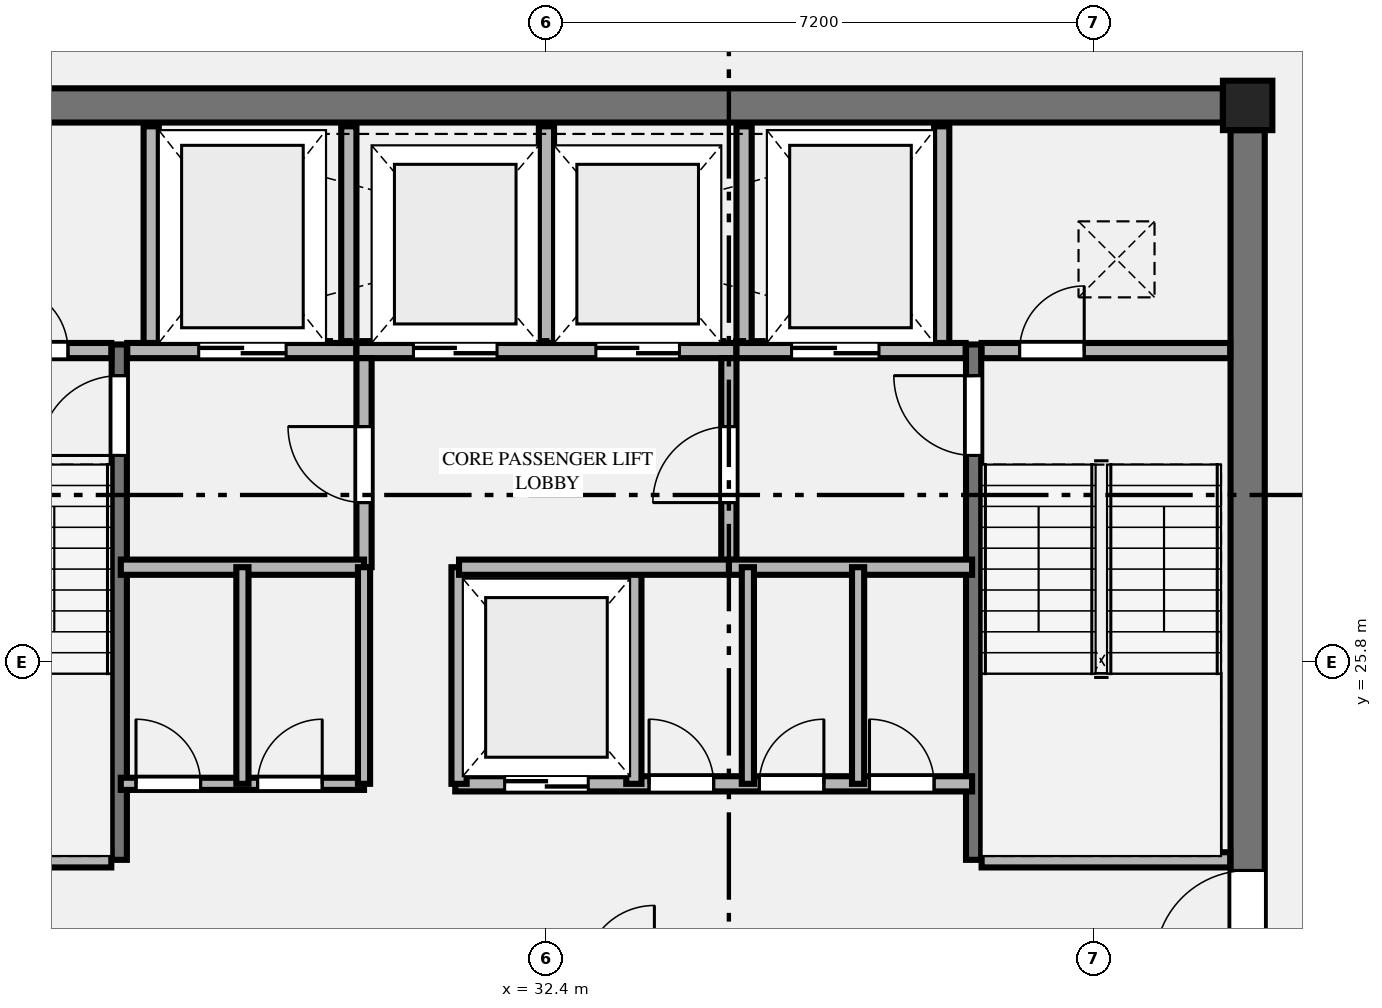
"""IFC4 building model, lengths in metres.
Left out: names, types, materials, properties, quantities, classifications, styles, units other than length and angle.
Written with IfcOpenShell. Run it as: python <this file> out.ifc"""

import sys

from ifc_helpers import new_model, si_unit, direction, frame, frame_2d, origin, origin_2d, place, context, subcontext, project, spatial, rectangle, extrude, element, fill, save


model = new_model("IFC4")
c1 = context("Model", 3, precision=1e-05, world=origin(), true_north=direction((0.0, 1.0)))
c2 = subcontext(c1, "Body", "Model", "MODEL_VIEW")
j1 = project(units=[si_unit("LENGTHUNIT", "METRE"), si_unit("PLANEANGLEUNIT", "RADIAN")], contexts=[c1])
p1 = place(None, origin())
s1 = spatial("IfcSite", under=j1, at=p1, CompositionType="ELEMENT")
p2 = place(p1, origin())
s2 = spatial("IfcBuilding", under=s1, at=p2, CompositionType="ELEMENT")
p3 = place(p2, frame((0.0, 0.0, 227.0)))
s3 = spatial("IfcBuildingStorey", under=s2, at=p3, CompositionType="ELEMENT", Elevation=227.0)
p4 = place(p3, frame((41.625, 33.125, 0.0), z_axis=(0.0, 0.0, 1.0), x_axis=(1.0, 0.0, 0.0)))
e1 = element("IfcColumn", 1, at=p4, inside=s3, PredefinedType="COLUMN", context=c2, shape_type="SweptSolid", body=[
    extrude(rectangle(XDim=0.65, YDim=0.65, at=origin_2d()), origin(), (0.0, 0.0, 1.0), 3.65),
])
p5 = place(p3, frame((23.5, 33.125, 0.0), z_axis=(0.0, 0.0, 1.0), x_axis=(1.0, 0.0, 0.0)))
e2 = element("IfcWall", 2, at=p5, inside=s3, PredefinedType="SHEAR", context=c2, shape_type="SweptSolid", body=[
    extrude(rectangle(XDim=17.8, YDim=0.45, at=frame_2d((8.9, 0.0))), origin(), (0.0, 0.0, 1.0), 3.45),
])
p6 = place(p3, frame((41.625, 19.0, 0.0), z_axis=(0.0, 0.0, 1.0), x_axis=(0.0, 1.0, 0.0)))
e3 = element("IfcWall", 3, at=p6, inside=s3, PredefinedType="SHEAR", context=c2, shape_type="SweptSolid", body=[
    extrude(rectangle(XDim=13.8, YDim=0.45, at=frame_2d((6.9, 0.0))), origin(), (0.0, 0.0, 1.0), 3.45),
])
p7 = place(p6, frame((2.84, 0.0, 0.0)))
e4 = element("IfcOpeningElement", 4, at=p7, cuts=e3, PredefinedType="OPENING", context=c2, shape_type="SweptSolid", body=[
    extrude(rectangle(XDim=1.22, YDim=2.25, at=frame_2d((0.61, 1.125))), frame((0.0, 0.235, 0.0), z_axis=(0.0, -1.0, 0.0), x_axis=(1.0, 0.0, 0.0)), (0.0, 0.0, 1.0), 0.47),
])
p8 = place(p3, frame((26.78, 23.2, 0.0), z_axis=(0.0, 0.0, 1.0), x_axis=(0.0, 1.0, 0.0)))
e5 = element("IfcWall", 5, at=p8, inside=s3, PredefinedType="SHEAR", context=c2, shape_type="SweptSolid", body=[
    extrude(rectangle(XDim=6.78, YDim=0.2, at=frame_2d((3.39, 0.0))), origin(), (0.0, 0.0, 1.0), 3.65),
])
p9 = place(p8, frame((5.32, 0.0, 0.0)))
e6 = element("IfcOpeningElement", 6, at=p9, cuts=e5, PredefinedType="OPENING", context=c2, shape_type="SweptSolid", body=[
    extrude(rectangle(XDim=1.05, YDim=2.15, at=frame_2d((0.525, 1.075))), frame((0.0, 0.11, 0.0), z_axis=(0.0, -1.0, 0.0), x_axis=(1.0, 0.0, 0.0)), (0.0, 0.0, 1.0), 0.22),
])
p10 = place(p3, frame((23.405, 23.2, 0.0), z_axis=(0.0, 0.0, 1.0), x_axis=(1.0, 0.0, 0.0)))
e7 = element("IfcWall", 7, at=p10, inside=s3, PredefinedType="PLUMBINGWALL", context=c2, shape_type="SweptSolid", body=[
    extrude(rectangle(XDim=3.27, YDim=0.2, at=frame_2d((1.635, 0.0))), origin(), (0.0, 0.0, 1.0), 3.45),
])
p11 = place(p3, frame((38.02, 23.2, 0.0), z_axis=(0.0, 0.0, 1.0), x_axis=(0.0, 1.0, 0.0)))
e8 = element("IfcWall", 8, at=p11, inside=s3, PredefinedType="SHEAR", context=c2, shape_type="SweptSolid", body=[
    extrude(rectangle(XDim=6.78, YDim=0.2, at=frame_2d((3.39, 0.0))), origin(), (0.0, 0.0, 1.0), 3.65),
])
p12 = place(p11, frame((5.32, 0.0, 0.0)))
e9 = element("IfcOpeningElement", 9, at=p12, cuts=e8, PredefinedType="OPENING", context=c2, shape_type="SweptSolid", body=[
    extrude(rectangle(XDim=1.05, YDim=2.15, at=frame_2d((0.525, 1.075))), frame((0.0, 0.11, 0.0), z_axis=(0.0, -1.0, 0.0), x_axis=(1.0, 0.0, 0.0)), (0.0, 0.0, 1.0), 0.22),
])
p13 = place(p3, frame((38.125, 23.2, 0.0), z_axis=(0.0, 0.0, 1.0), x_axis=(1.0, 0.0, 0.0)))
e10 = element("IfcWall", 10, at=p13, inside=s3, PredefinedType="PLUMBINGWALL", context=c2, shape_type="SweptSolid", body=[
    extrude(rectangle(XDim=3.27, YDim=0.2, at=frame_2d((1.635, 0.0))), origin(), (0.0, 0.0, 1.0), 3.45),
])
p14 = place(p3, frame((23.405, 29.9, 0.0), z_axis=(0.0, 0.0, 1.0), x_axis=(1.0, 0.0, 0.0)))
e11 = element("IfcWall", 11, at=p14, inside=s3, PredefinedType="PLUMBINGWALL", context=c2, shape_type="SweptSolid", body=[
    extrude(rectangle(XDim=3.27, YDim=0.2, at=frame_2d((1.635, 0.0))), origin(), (0.0, 0.0, 1.0), 3.45),
])
p15 = place(p14, frame((1.85, 0.0, 0.0)))
e12 = element("IfcOpeningElement", 12, at=p15, cuts=e11, PredefinedType="OPENING", context=c2, shape_type="SweptSolid", body=[
    extrude(rectangle(XDim=0.85, YDim=2.05, at=frame_2d((0.425, 1.025))), frame((0.0, 0.11, 0.0), z_axis=(0.0, -1.0, 0.0), x_axis=(1.0, 0.0, 0.0)), (0.0, 0.0, 1.0), 0.22),
])
p16 = place(p3, frame((26.885, 29.9, 0.0), z_axis=(0.0, 0.0, 1.0), x_axis=(1.0, 0.0, 0.0)))
e13 = element("IfcWall", 13, at=p16, inside=s3, PredefinedType="PLUMBINGWALL", context=c2, shape_type="SweptSolid", body=[
    extrude(rectangle(XDim=3.015, YDim=0.2, at=frame_2d((1.507, 0.0))), origin(), (0.0, 0.0, 1.0), 3.45),
])
p17 = place(p16, frame((0.94, 0.0, 0.0)))
e14 = element("IfcOpeningElement", 14, at=p17, cuts=e13, PredefinedType="OPENING", context=c2, shape_type="SweptSolid", body=[
    extrude(rectangle(XDim=1.15, YDim=2.2, at=frame_2d((0.575, 1.1))), frame((0.0, 0.11, 0.0), z_axis=(0.0, -1.0, 0.0), x_axis=(1.0, 0.0, 0.0)), (0.0, 0.0, 1.0), 0.22),
])
p18 = place(p3, frame((29.9, 29.9, 0.0), z_axis=(0.0, 0.0, 1.0), x_axis=(1.0, 0.0, 0.0)))
e15 = element("IfcWall", 15, at=p18, inside=s3, PredefinedType="PLUMBINGWALL", context=c2, shape_type="SweptSolid", body=[
    extrude(rectangle(XDim=5.0, YDim=0.2, at=frame_2d((2.5, 0.0))), origin(), (0.0, 0.0, 1.0), 3.45),
])
p19 = place(p18, frame((0.75, 0.0, 0.0)))
e16 = element("IfcOpeningElement", 16, at=p19, cuts=e15, PredefinedType="OPENING", context=c2, shape_type="SweptSolid", body=[
    extrude(rectangle(XDim=1.1, YDim=2.2, at=frame_2d((0.55, 1.1))), frame((0.0, 0.11, 0.0), z_axis=(0.0, -1.0, 0.0), x_axis=(1.0, 0.0, 0.0)), (0.0, 0.0, 1.0), 0.22),
])
p20 = place(p18, frame((3.15, 0.0, 0.0)))
e17 = element("IfcOpeningElement", 17, at=p20, cuts=e15, PredefinedType="OPENING", context=c2, shape_type="SweptSolid", body=[
    extrude(rectangle(XDim=1.1, YDim=2.2, at=frame_2d((0.55, 1.1))), frame((0.0, 0.11, 0.0), z_axis=(0.0, -1.0, 0.0), x_axis=(1.0, 0.0, 0.0)), (0.0, 0.0, 1.0), 0.22),
])
p21 = place(p3, frame((34.9, 29.9, 0.0), z_axis=(0.0, 0.0, 1.0), x_axis=(1.0, 0.0, 0.0)))
e18 = element("IfcWall", 18, at=p21, inside=s3, PredefinedType="PLUMBINGWALL", context=c2, shape_type="SweptSolid", body=[
    extrude(rectangle(XDim=3.015, YDim=0.2, at=frame_2d((1.508, 0.0))), origin(), (0.0, 0.0, 1.0), 3.45),
])
p22 = place(p21, frame((0.725, 0.0, 0.0)))
e19 = element("IfcOpeningElement", 19, at=p22, cuts=e18, PredefinedType="OPENING", context=c2, shape_type="SweptSolid", body=[
    extrude(rectangle(XDim=1.15, YDim=2.2, at=frame_2d((0.575, 1.1))), frame((0.0, 0.11, 0.0), z_axis=(0.0, -1.0, 0.0), x_axis=(1.0, 0.0, 0.0)), (0.0, 0.0, 1.0), 0.22),
])
p23 = place(p3, frame((38.125, 29.9, 0.0), z_axis=(0.0, 0.0, 1.0), x_axis=(1.0, 0.0, 0.0)))
e20 = element("IfcWall", 20, at=p23, inside=s3, PredefinedType="PLUMBINGWALL", context=c2, shape_type="SweptSolid", body=[
    extrude(rectangle(XDim=3.27, YDim=0.2, at=frame_2d((1.635, 0.0))), origin(), (0.0, 0.0, 1.0), 3.45),
])
p24 = place(p23, frame((0.5, 0.0, 0.0)))
e21 = element("IfcOpeningElement", 21, at=p24, cuts=e20, PredefinedType="OPENING", context=c2, shape_type="SweptSolid", body=[
    extrude(rectangle(XDim=0.85, YDim=2.05, at=frame_2d((0.425, 1.025))), frame((0.0, 0.11, 0.0), z_axis=(0.0, -1.0, 0.0), x_axis=(1.0, 0.0, 0.0)), (0.0, 0.0, 1.0), 0.22),
])
for number, where, z_axis, x_axis in (
    (22, (27.2, 30.0, 0.0), (0.0, 0.0, 1.0), (0.0, 1.0, 0.0)),
    (23, (29.8, 30.0, 0.0), (0.0, 0.0, 1.0), (0.0, 1.0, 0.0)),
    (24, (32.4, 30.0, 0.0), (0.0, 0.0, 1.0), (0.0, 1.0, 0.0)),
    (25, (35.0, 30.0, 0.0), (0.0, 0.0, 1.0), (0.0, 1.0, 0.0)),
    (26, (37.6, 30.0, 0.0), (0.0, 0.0, 1.0), (0.0, 1.0, 0.0)),
):
    element("IfcWall", number, at=place(p3, frame(where, z_axis=z_axis, x_axis=x_axis)), inside=s3, PredefinedType="PLUMBINGWALL", context=c2, shape_type="SweptSolid", body=[
        extrude(rectangle(XDim=2.85, YDim=0.2, at=frame_2d((1.425, 0.0))), origin(), (0.0, 0.0, 1.0), 3.45),
    ])
p25 = place(p3, frame((30.0, 27.05, 0.0), z_axis=(0.0, 0.0, 1.0), x_axis=(0.0, 1.0, 0.0)))
e27 = element("IfcWall", 27, at=p25, inside=s3, PredefinedType="PLUMBINGWALL", context=c2, shape_type="SweptSolid", body=[
    extrude(rectangle(XDim=2.75, YDim=0.2, at=frame_2d((1.375, 0.0))), origin(), (0.0, 0.0, 1.0), 3.45),
])
p26 = place(p25, frame((0.85, 0.0, 0.0)))
e28 = element("IfcOpeningElement", 28, at=p26, cuts=e27, PredefinedType="OPENING", context=c2, shape_type="SweptSolid", body=[
    extrude(rectangle(XDim=1.0, YDim=2.15, at=frame_2d((0.5, 1.075))), frame((0.0, 0.11, 0.0), z_axis=(0.0, -1.0, 0.0), x_axis=(1.0, 0.0, 0.0)), (0.0, 0.0, 1.0), 0.22),
])
p27 = place(p3, frame((26.8, 27.05, 0.0), z_axis=(0.0, 0.0, 1.0), x_axis=(1.0, 0.0, 0.0)))
e29 = element("IfcWall", 29, at=p27, inside=s3, PredefinedType="PLUMBINGWALL", context=c2, shape_type="SweptSolid", body=[
    extrude(rectangle(XDim=3.2, YDim=0.2, at=frame_2d((1.6, 0.0))), origin(), (0.0, 0.0, 1.0), 3.45),
])
p28 = place(p3, frame((34.8, 27.05, 0.0), z_axis=(0.0, 0.0, 1.0), x_axis=(0.0, 1.0, 0.0)))
e30 = element("IfcWall", 30, at=p28, inside=s3, PredefinedType="PLUMBINGWALL", context=c2, shape_type="SweptSolid", body=[
    extrude(rectangle(XDim=2.75, YDim=0.2, at=frame_2d((1.375, 0.0))), origin(), (0.0, 0.0, 1.0), 3.45),
])
p29 = place(p28, frame((0.85, 0.0, 0.0)))
e31 = element("IfcOpeningElement", 31, at=p29, cuts=e30, PredefinedType="OPENING", context=c2, shape_type="SweptSolid", body=[
    extrude(rectangle(XDim=1.0, YDim=2.15, at=frame_2d((0.5, 1.075))), frame((0.0, 0.11, 0.0), z_axis=(0.0, -1.0, 0.0), x_axis=(1.0, 0.0, 0.0)), (0.0, 0.0, 1.0), 0.22),
])
p30 = place(p3, frame((34.8, 27.05, 0.0), z_axis=(0.0, 0.0, 1.0), x_axis=(1.0, 0.0, 0.0)))
e32 = element("IfcWall", 32, at=p30, inside=s3, PredefinedType="PLUMBINGWALL", context=c2, shape_type="SweptSolid", body=[
    extrude(rectangle(XDim=3.2, YDim=0.2, at=frame_2d((1.6, 0.0))), origin(), (0.0, 0.0, 1.0), 3.45),
])
p31 = place(p3, frame((26.8, 24.2, 0.0), z_axis=(0.0, 0.0, 1.0), x_axis=(1.0, 0.0, 0.0)))
e33 = element("IfcWall", 33, at=p31, inside=s3, PredefinedType="PARTITIONING", context=c2, shape_type="SweptSolid", body=[
    extrude(rectangle(XDim=3.2, YDim=0.16, at=frame_2d((1.6, 0.0))), origin(), (0.0, 0.0, 1.0), 3.45),
])
p32 = place(p31, frame((0.2, 0.0, 0.0)))
e34 = element("IfcOpeningElement", 34, at=p32, cuts=e33, PredefinedType="OPENING", context=c2, shape_type="SweptSolid", body=[
    extrude(rectangle(XDim=0.85, YDim=2.05, at=frame_2d((0.425, 1.025))), frame((0.0, 0.09, 0.0), z_axis=(0.0, -1.0, 0.0), x_axis=(1.0, 0.0, 0.0)), (0.0, 0.0, 1.0), 0.18),
])
p33 = place(p31, frame((1.8, 0.0, 0.0)))
e35 = element("IfcOpeningElement", 35, at=p33, cuts=e33, PredefinedType="OPENING", context=c2, shape_type="SweptSolid", body=[
    extrude(rectangle(XDim=0.85, YDim=2.05, at=frame_2d((0.425, 1.025))), frame((0.0, 0.09, 0.0), z_axis=(0.0, -1.0, 0.0), x_axis=(1.0, 0.0, 0.0)), (0.0, 0.0, 1.0), 0.18),
])
p34 = place(p3, frame((30.0, 24.2, 0.0), z_axis=(0.0, 0.0, 1.0), x_axis=(0.0, 1.0, 0.0)))
e36 = element("IfcWall", 36, at=p34, inside=s3, PredefinedType="PARTITIONING", context=c2, shape_type="SweptSolid", body=[
    extrude(rectangle(XDim=2.85, YDim=0.16, at=frame_2d((1.425, 0.0))), origin(), (0.0, 0.0, 1.0), 3.45),
])
p35 = place(p3, frame((31.2, 24.2, 0.0), z_axis=(0.0, 0.0, 1.0), x_axis=(1.0, 0.0, 0.0)))
e37 = element("IfcWall", 37, at=p35, inside=s3, PredefinedType="PLUMBINGWALL", context=c2, shape_type="SweptSolid", body=[
    extrude(rectangle(XDim=6.8, YDim=0.2, at=frame_2d((3.4, 0.0))), origin(), (0.0, 0.0, 1.0), 3.45),
])
p36 = place(p35, frame((0.65, 0.0, 0.0)))
e38 = element("IfcOpeningElement", 38, at=p36, cuts=e37, PredefinedType="OPENING", context=c2, shape_type="SweptSolid", body=[
    extrude(rectangle(XDim=1.1, YDim=2.2, at=frame_2d((0.55, 1.1))), frame((0.0, 0.11, 0.0), z_axis=(0.0, -1.0, 0.0), x_axis=(1.0, 0.0, 0.0)), (0.0, 0.0, 1.0), 0.22),
])
p37 = place(p35, frame((2.55, 0.0, 0.0)))
e39 = element("IfcOpeningElement", 39, at=p37, cuts=e37, PredefinedType="OPENING", context=c2, shape_type="SweptSolid", body=[
    extrude(rectangle(XDim=0.85, YDim=2.05, at=frame_2d((0.425, 1.025))), frame((0.0, 0.11, 0.0), z_axis=(0.0, -1.0, 0.0), x_axis=(1.0, 0.0, 0.0)), (0.0, 0.0, 1.0), 0.22),
])
p38 = place(p35, frame((4.0, 0.0, 0.0)))
e40 = element("IfcOpeningElement", 40, at=p38, cuts=e37, PredefinedType="OPENING", context=c2, shape_type="SweptSolid", body=[
    extrude(rectangle(XDim=0.85, YDim=2.05, at=frame_2d((0.425, 1.025))), frame((0.0, 0.11, 0.0), z_axis=(0.0, -1.0, 0.0), x_axis=(1.0, 0.0, 0.0)), (0.0, 0.0, 1.0), 0.22),
])
p39 = place(p35, frame((5.45, 0.0, 0.0)))
e41 = element("IfcOpeningElement", 41, at=p39, cuts=e37, PredefinedType="OPENING", context=c2, shape_type="SweptSolid", body=[
    extrude(rectangle(XDim=0.85, YDim=2.05, at=frame_2d((0.425, 1.025))), frame((0.0, 0.11, 0.0), z_axis=(0.0, -1.0, 0.0), x_axis=(1.0, 0.0, 0.0)), (0.0, 0.0, 1.0), 0.22),
])
for number, where, z_axis, x_axis in (
    (42, (31.25, 24.2, 0.0), (0.0, 0.0, 1.0), (0.0, 1.0, 0.0)),
    (43, (33.55, 24.2, 0.0), (0.0, 0.0, 1.0), (0.0, 1.0, 0.0)),
):
    element("IfcWall", number, at=place(p3, frame(where, z_axis=z_axis, x_axis=x_axis)), inside=s3, PredefinedType="PLUMBINGWALL", context=c2, shape_type="SweptSolid", body=[
        extrude(rectangle(XDim=2.85, YDim=0.2, at=frame_2d((1.425, 0.0))), origin(), (0.0, 0.0, 1.0), 3.45),
    ])
p40 = place(p3, frame((31.25, 27.05, 0.0), z_axis=(0.0, 0.0, 1.0), x_axis=(1.0, 0.0, 0.0)))
e44 = element("IfcWall", 44, at=p40, inside=s3, PredefinedType="PLUMBINGWALL", context=c2, shape_type="SweptSolid", body=[
    extrude(rectangle(XDim=3.55, YDim=0.2, at=frame_2d((1.775, 0.0))), origin(), (0.0, 0.0, 1.0), 3.45),
])
for number, where, z_axis, x_axis in (
    (45, (28.4, 24.2, 0.0), (0.0, 0.0, 1.0), (0.0, 1.0, 0.0)),
    (46, (35.05, 24.2, 0.0), (0.0, 0.0, 1.0), (0.0, 1.0, 0.0)),
    (47, (36.5, 24.2, 0.0), (0.0, 0.0, 1.0), (0.0, 1.0, 0.0)),
):
    element("IfcWall", number, at=place(p3, frame(where, z_axis=z_axis, x_axis=x_axis)), inside=s3, PredefinedType="PARTITIONING", context=c2, shape_type="SweptSolid", body=[
        extrude(rectangle(XDim=2.85, YDim=0.16, at=frame_2d((1.425, 0.0))), origin(), (0.0, 0.0, 1.0), 3.45),
    ])
p41 = place(p7, origin())
e48 = element("IfcDoor", 48, at=p41, inside=s3, OperationType="SINGLE_SWING_LEFT", PredefinedType="DOOR", context=c2, shape_type="SweptSolid", body=[
    extrude(rectangle(XDim=1.22, YDim=2.25, at=frame_2d((0.61, 1.125))), frame((0.0, 0.025, 0.0), z_axis=(0.0, -1.0, 0.0), x_axis=(1.0, 0.0, 0.0)), (0.0, 0.0, 1.0), 0.05),
])
fill(e4, e48)
p42 = place(p9, origin())
e49 = element("IfcDoor", 49, at=p42, inside=s3, OperationType="SINGLE_SWING_LEFT", PredefinedType="DOOR", context=c2, shape_type="SweptSolid", body=[
    extrude(rectangle(XDim=1.05, YDim=2.15, at=frame_2d((0.525, 1.075))), frame((0.0, 0.025, 0.0), z_axis=(0.0, -1.0, 0.0), x_axis=(1.0, 0.0, 0.0)), (0.0, 0.0, 1.0), 0.05),
])
fill(e6, e49)
p43 = place(p12, origin())
e50 = element("IfcDoor", 50, at=p43, inside=s3, OperationType="SINGLE_SWING_RIGHT", PredefinedType="DOOR", context=c2, shape_type="SweptSolid", body=[
    extrude(rectangle(XDim=1.05, YDim=2.15, at=frame_2d((0.525, 1.075))), frame((0.0, 0.025, 0.0), z_axis=(0.0, -1.0, 0.0), x_axis=(1.0, 0.0, 0.0)), (0.0, 0.0, 1.0), 0.05),
])
fill(e9, e50)
p44 = place(p15, origin())
e51 = element("IfcDoor", 51, at=p44, inside=s3, OperationType="SINGLE_SWING_LEFT", PredefinedType="DOOR", context=c2, shape_type="SweptSolid", body=[
    extrude(rectangle(XDim=0.85, YDim=2.05, at=frame_2d((0.425, 1.025))), frame((0.0, 0.025, 0.0), z_axis=(0.0, -1.0, 0.0), x_axis=(1.0, 0.0, 0.0)), (0.0, 0.0, 1.0), 0.05),
])
fill(e12, e51)
p45 = place(p24, origin())
e52 = element("IfcDoor", 52, at=p45, inside=s3, OperationType="SINGLE_SWING_RIGHT", PredefinedType="DOOR", context=c2, shape_type="SweptSolid", body=[
    extrude(rectangle(XDim=0.85, YDim=2.05, at=frame_2d((0.425, 1.025))), frame((0.0, 0.025, 0.0), z_axis=(0.0, -1.0, 0.0), x_axis=(1.0, 0.0, 0.0)), (0.0, 0.0, 1.0), 0.05),
])
fill(e21, e52)
p46 = place(p17, origin())
e53 = element("IfcDoor", 53, at=p46, inside=s3, OperationType="DOUBLE_DOOR_SLIDING", PredefinedType="DOOR", context=c2, shape_type="SweptSolid", body=[
    extrude(rectangle(XDim=1.15, YDim=2.2, at=frame_2d((0.575, 1.1))), frame((0.0, 0.025, 0.0), z_axis=(0.0, -1.0, 0.0), x_axis=(1.0, 0.0, 0.0)), (0.0, 0.0, 1.0), 0.05),
])
fill(e14, e53)
p47 = place(p22, origin())
e54 = element("IfcDoor", 54, at=p47, inside=s3, OperationType="DOUBLE_DOOR_SLIDING", PredefinedType="DOOR", context=c2, shape_type="SweptSolid", body=[
    extrude(rectangle(XDim=1.15, YDim=2.2, at=frame_2d((0.575, 1.1))), frame((0.0, 0.025, 0.0), z_axis=(0.0, -1.0, 0.0), x_axis=(1.0, 0.0, 0.0)), (0.0, 0.0, 1.0), 0.05),
])
fill(e19, e54)
p48 = place(p19, origin())
e55 = element("IfcDoor", 55, at=p48, inside=s3, OperationType="DOUBLE_DOOR_SLIDING", PredefinedType="DOOR", context=c2, shape_type="SweptSolid", body=[
    extrude(rectangle(XDim=1.1, YDim=2.2, at=frame_2d((0.55, 1.1))), frame((0.0, 0.025, 0.0), z_axis=(0.0, -1.0, 0.0), x_axis=(1.0, 0.0, 0.0)), (0.0, 0.0, 1.0), 0.05),
])
fill(e16, e55)
p49 = place(p20, origin())
e56 = element("IfcDoor", 56, at=p49, inside=s3, OperationType="DOUBLE_DOOR_SLIDING", PredefinedType="DOOR", context=c2, shape_type="SweptSolid", body=[
    extrude(rectangle(XDim=1.1, YDim=2.2, at=frame_2d((0.55, 1.1))), frame((0.0, 0.025, 0.0), z_axis=(0.0, -1.0, 0.0), x_axis=(1.0, 0.0, 0.0)), (0.0, 0.0, 1.0), 0.05),
])
fill(e17, e56)
p50 = place(p26, origin())
e57 = element("IfcDoor", 57, at=p50, inside=s3, OperationType="SINGLE_SWING_RIGHT", PredefinedType="DOOR", context=c2, shape_type="SweptSolid", body=[
    extrude(rectangle(XDim=1.0, YDim=2.15, at=frame_2d((0.5, 1.075))), frame((0.0, 0.025, 0.0), z_axis=(0.0, -1.0, 0.0), x_axis=(1.0, 0.0, 0.0)), (0.0, 0.0, 1.0), 0.05),
])
fill(e28, e57)
p51 = place(p29, origin())
e58 = element("IfcDoor", 58, at=p51, inside=s3, OperationType="SINGLE_SWING_LEFT", PredefinedType="DOOR", context=c2, shape_type="SweptSolid", body=[
    extrude(rectangle(XDim=1.0, YDim=2.15, at=frame_2d((0.5, 1.075))), frame((0.0, 0.025, 0.0), z_axis=(0.0, -1.0, 0.0), x_axis=(1.0, 0.0, 0.0)), (0.0, 0.0, 1.0), 0.05),
])
fill(e31, e58)
p52 = place(p36, origin())
e59 = element("IfcDoor", 59, at=p52, inside=s3, OperationType="DOUBLE_DOOR_SLIDING", PredefinedType="DOOR", context=c2, shape_type="SweptSolid", body=[
    extrude(rectangle(XDim=1.1, YDim=2.2, at=frame_2d((0.55, 1.1))), frame((0.0, 0.025, 0.0), z_axis=(0.0, -1.0, 0.0), x_axis=(1.0, 0.0, 0.0)), (0.0, 0.0, 1.0), 0.05),
])
fill(e38, e59)
p53 = place(p32, origin())
e60 = element("IfcDoor", 60, at=p53, inside=s3, OperationType="SINGLE_SWING_LEFT", PredefinedType="DOOR", context=c2, shape_type="SweptSolid", body=[
    extrude(rectangle(XDim=0.85, YDim=2.05, at=frame_2d((0.425, 1.025))), frame((0.0, 0.025, 0.0), z_axis=(0.0, -1.0, 0.0), x_axis=(1.0, 0.0, 0.0)), (0.0, 0.0, 1.0), 0.05),
])
fill(e34, e60)
p54 = place(p33, origin())
e61 = element("IfcDoor", 61, at=p54, inside=s3, OperationType="SINGLE_SWING_RIGHT", PredefinedType="DOOR", context=c2, shape_type="SweptSolid", body=[
    extrude(rectangle(XDim=0.85, YDim=2.05, at=frame_2d((0.425, 1.025))), frame((0.0, 0.025, 0.0), z_axis=(0.0, -1.0, 0.0), x_axis=(1.0, 0.0, 0.0)), (0.0, 0.0, 1.0), 0.05),
])
fill(e35, e61)
p55 = place(p37, origin())
e62 = element("IfcDoor", 62, at=p55, inside=s3, OperationType="SINGLE_SWING_LEFT", PredefinedType="DOOR", context=c2, shape_type="SweptSolid", body=[
    extrude(rectangle(XDim=0.85, YDim=2.05, at=frame_2d((0.425, 1.025))), frame((0.0, 0.025, 0.0), z_axis=(0.0, -1.0, 0.0), x_axis=(1.0, 0.0, 0.0)), (0.0, 0.0, 1.0), 0.05),
])
fill(e39, e62)
p56 = place(p38, origin())
e63 = element("IfcDoor", 63, at=p56, inside=s3, OperationType="SINGLE_SWING_RIGHT", PredefinedType="DOOR", context=c2, shape_type="SweptSolid", body=[
    extrude(rectangle(XDim=0.85, YDim=2.05, at=frame_2d((0.425, 1.025))), frame((0.0, 0.025, 0.0), z_axis=(0.0, -1.0, 0.0), x_axis=(1.0, 0.0, 0.0)), (0.0, 0.0, 1.0), 0.05),
])
fill(e40, e63)
p57 = place(p39, origin())
e64 = element("IfcDoor", 64, at=p57, inside=s3, OperationType="SINGLE_SWING_LEFT", PredefinedType="DOOR", context=c2, shape_type="SweptSolid", body=[
    extrude(rectangle(XDim=0.85, YDim=2.05, at=frame_2d((0.425, 1.025))), frame((0.0, 0.025, 0.0), z_axis=(0.0, -1.0, 0.0), x_axis=(1.0, 0.0, 0.0)), (0.0, 0.0, 1.0), 0.05),
])
fill(e41, e64)
save(model, sys.argv[1])
